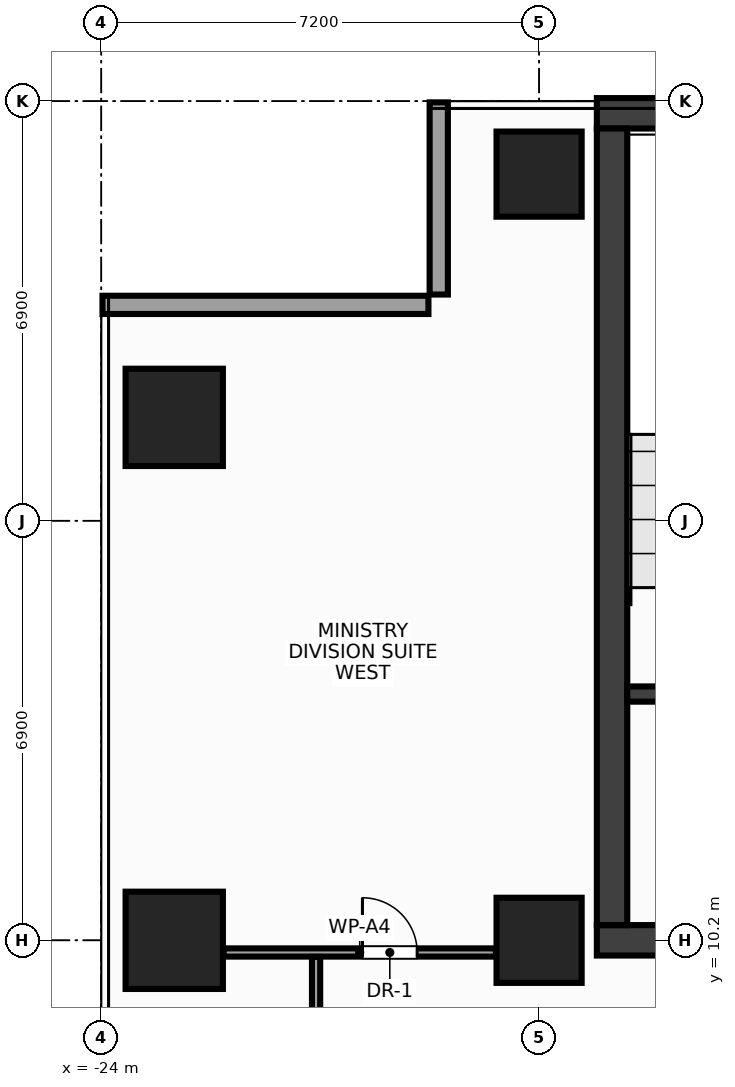
"""IFC4 building model, lengths in metres.
Left out: names, types, materials, properties, quantities, classifications, styles, units other than length and angle.
Written with IfcOpenShell. Run it as: python <this file> out.ifc"""

import sys

from ifc_helpers import new_model, si_unit, direction, frame, frame_2d, origin, origin_2d, place, context, subcontext, project, spatial, rectangle, extrude, source, transform, mapped, element, fill, save


model = new_model("IFC4")
c1 = context("Model", 3, precision=1e-05, world=origin(), true_north=direction((0.0, 1.0)))
c2 = subcontext(c1, "Body", "Model", "MODEL_VIEW")
j1 = project(units=[si_unit("LENGTHUNIT", "METRE"), si_unit("PLANEANGLEUNIT", "RADIAN")], contexts=[c1])
p1 = place(None, origin())
s1 = spatial("IfcSite", under=j1, at=p1, CompositionType="ELEMENT")
p2 = place(p1, origin())
s2 = spatial("IfcBuilding", under=s1, at=p2, CompositionType="ELEMENT")
p3 = place(p2, frame((0.0, 0.0, 203.6)))
s3 = spatial("IfcBuildingStorey", under=s2, at=p3, CompositionType="ELEMENT", Elevation=203.6)
m1 = source(origin(), c2, "Body", "SweptSolid", [
    extrude(rectangle(XDim=31.7, YDim=0.5, at=frame_2d((15.85, 0.0))), origin(), (0.0, 0.0, 1.0), 3.6),
])
p4 = place(p3, frame((-15.85, 23.8, 0.0), z_axis=(0.0, 0.0, 1.0), x_axis=(1.0, 0.0, 0.0)))
e1 = element("IfcWall", 1, at=p4, inside=s3, PredefinedType="SHEAR", context=c2, shape_type="MappedRepresentation", body=[
    mapped(m1, transform((0.0, 0.0, 0.0), x_axis=(1.0, 0.0, 0.0), y_axis=(0.0, 1.0, 0.0), z_axis=(0.0, 0.0, 1.0), scale=1.0)),
])
p5 = place(p3, frame((-15.85, 10.2, 0.0), z_axis=(0.0, 0.0, 1.0), x_axis=(1.0, 0.0, 0.0)))
e2 = element("IfcWall", 2, at=p5, inside=s3, PredefinedType="SHEAR", context=c2, shape_type="MappedRepresentation", body=[
    mapped(m1, transform((0.0, 0.0, 0.0), x_axis=(1.0, 0.0, 0.0), y_axis=(0.0, 1.0, 0.0), z_axis=(0.0, 0.0, 1.0), scale=1.0)),
])
p6 = place(p5, frame((1.7, 0.0, 0.0)))
e3 = element("IfcOpeningElement", 3, at=p6, cuts=e2, PredefinedType="OPENING", context=c2, shape_type="SweptSolid", body=[
    extrude(rectangle(XDim=1.6, YDim=2.15, at=frame_2d((0.8, 1.075))), frame((0.0, 0.262, 0.0), z_axis=(0.0, -1.0, 0.0), x_axis=(1.0, 0.0, 0.0)), (0.0, 0.0, 1.0), 0.524),
])
p7 = place(p5, frame((28.4, 0.0, 0.0)))
e4 = element("IfcOpeningElement", 4, at=p7, cuts=e2, PredefinedType="OPENING", context=c2, shape_type="SweptSolid", body=[
    extrude(rectangle(XDim=1.6, YDim=2.15, at=frame_2d((0.8, 1.075))), frame((0.0, 0.262, 0.0), z_axis=(0.0, -1.0, 0.0), x_axis=(1.0, 0.0, 0.0)), (0.0, 0.0, 1.0), 0.524),
])
p8 = place(p5, frame((15.1, 0.0, 0.0)))
e5 = element("IfcOpeningElement", 5, at=p8, cuts=e2, PredefinedType="OPENING", context=c2, shape_type="SweptSolid", body=[
    extrude(rectangle(XDim=1.5, YDim=2.2, at=frame_2d((0.75, 1.1))), frame((0.0, 0.262, 0.0), z_axis=(0.0, -1.0, 0.0), x_axis=(1.0, 0.0, 0.0)), (0.0, 0.0, 1.0), 0.524),
])
m2 = source(origin(), c2, "Body", "SweptSolid", [
    extrude(rectangle(XDim=13.1, YDim=0.5, at=frame_2d((6.55, 0.0))), origin(), (0.0, 0.0, 1.0), 3.6),
])
p9 = place(p3, frame((-15.6, 10.45, 0.0), z_axis=(0.0, 0.0, 1.0), x_axis=(0.0, 1.0, 0.0)))
e6 = element("IfcWall", 6, at=p9, inside=s3, PredefinedType="SHEAR", context=c2, shape_type="MappedRepresentation", body=[
    mapped(m2, transform((0.0, 0.0, 0.0), x_axis=(1.0, 0.0, 0.0), y_axis=(0.0, 1.0, 0.0), z_axis=(0.0, 0.0, 1.0), scale=1.0)),
])
m3 = source(origin(), c2, "Body", "SweptSolid", [
    extrude(rectangle(XDim=3.705, YDim=0.25, at=frame_2d((1.853, 0.0))), origin(), (0.0, 0.0, 1.0), 3.6),
])
p10 = place(p3, frame((-15.35, 14.25, 0.0), z_axis=(0.0, 0.0, 1.0), x_axis=(1.0, 0.0, 0.0)))
e7 = element("IfcWall", 7, at=p10, inside=s3, PredefinedType="SHEAR", context=c2, shape_type="MappedRepresentation", body=[
    mapped(m3, transform((0.0, 0.0, 0.0), x_axis=(1.0, 0.0, 0.0), y_axis=(0.0, 1.0, 0.0), z_axis=(0.0, 0.0, 1.0), scale=1.0)),
])
p11 = place(p10, frame((0.95, 0.0, 0.0)))
e8 = element("IfcOpeningElement", 8, at=p11, cuts=e7, PredefinedType="OPENING", context=c2, shape_type="SweptSolid", body=[
    extrude(rectangle(XDim=1.6, YDim=2.15, at=frame_2d((0.8, 1.075))), frame((0.0, 0.137, 0.0), z_axis=(0.0, -1.0, 0.0), x_axis=(1.0, 0.0, 0.0)), (0.0, 0.0, 1.0), 0.274),
])
m4 = source(origin(), c2, "Body", "SweptSolid", [
    extrude(rectangle(XDim=1.4, YDim=1.4, at=origin_2d()), origin(), (0.0, 0.0, 1.0), 3.6),
])
for number, where, z_axis, x_axis in (
    (9, (-16.8, 10.2, 0.0), (0.0, 0.0, 1.0), (1.0, 0.0, 0.0)),
    (10, (-16.8, 22.8, 0.0), (0.0, 0.0, 1.0), (1.0, 0.0, 0.0)),
):
    element("IfcColumn", number, at=place(p3, frame(where, z_axis=z_axis, x_axis=x_axis)), inside=s3, PredefinedType="COLUMN", context=c2, shape_type="MappedRepresentation", body=[
        mapped(m4, transform((0.0, 0.0, 0.0), x_axis=(1.0, 0.0, 0.0), y_axis=(0.0, 1.0, 0.0), z_axis=(0.0, 0.0, 1.0), scale=1.0)),
    ])
m5 = source(origin(), c2, "Body", "SweptSolid", [
    extrude(rectangle(XDim=1.6, YDim=1.6, at=origin_2d()), origin(), (0.0, 0.0, 1.0), 3.6),
])
for number, where, z_axis, x_axis in (
    (11, (-22.8, 10.2, 0.0), (0.0, 0.0, 1.0), (1.0, 0.0, 0.0)),
    (12, (-22.8, 18.8, 0.0), (0.0, 0.0, 1.0), (1.0, 0.0, 0.0)),
):
    element("IfcColumn", number, at=place(p3, frame(where, z_axis=z_axis, x_axis=x_axis)), inside=s3, PredefinedType="COLUMN", context=c2, shape_type="MappedRepresentation", body=[
        mapped(m5, transform((0.0, 0.0, 0.0), x_axis=(1.0, 0.0, 0.0), y_axis=(0.0, 1.0, 0.0), z_axis=(0.0, 0.0, 1.0), scale=1.0)),
    ])
m6 = source(origin(), c2, "Body", "SweptSolid", [
    extrude(rectangle(XDim=3.16, YDim=0.3, at=frame_2d((1.58, 0.0))), origin(), (0.0, 0.0, 1.0), 2.76),
])
p12 = place(p3, frame((-18.45, 23.98, 0.0), z_axis=(0.0, 0.0, 1.0), x_axis=(0.0, -1.0, 0.0)))
e13 = element("IfcWall", 13, at=p12, inside=s3, PredefinedType="STANDARD", context=c2, shape_type="MappedRepresentation", body=[
    mapped(m6, transform((0.0, 0.0, 0.0), x_axis=(1.0, 0.0, 0.0), y_axis=(0.0, 1.0, 0.0), z_axis=(0.0, 0.0, 1.0), scale=1.0)),
])
m7 = source(origin(), c2, "Body", "SweptSolid", [
    extrude(rectangle(XDim=5.36, YDim=0.3, at=frame_2d((2.68, 0.0))), origin(), (0.0, 0.0, 1.0), 2.76),
])
p13 = place(p3, frame((-18.62, 20.65, 0.0), z_axis=(0.0, 0.0, 1.0), x_axis=(-1.0, 0.0, 0.0)))
e14 = element("IfcWall", 14, at=p13, inside=s3, PredefinedType="STANDARD", context=c2, shape_type="MappedRepresentation", body=[
    mapped(m7, transform((0.0, 0.0, 0.0), x_axis=(1.0, 0.0, 0.0), y_axis=(0.0, 1.0, 0.0), z_axis=(0.0, 0.0, 1.0), scale=1.0)),
])
m8 = source(origin(), c2, "Body", "SweptSolid", [
    extrude(rectangle(XDim=4.48, YDim=0.135, at=frame_2d((2.24, 0.0))), origin(), (0.0, 0.0, 1.0), 2.915),
])
p14 = place(p3, frame((-21.99, 10.0, 0.0), z_axis=(0.0, 0.0, 1.0), x_axis=(1.0, 0.0, 0.0)))
e15 = element("IfcWall", 15, at=p14, inside=s3, PredefinedType="PARTITIONING", context=c2, shape_type="MappedRepresentation", body=[
    mapped(m8, transform((0.0, 0.0, 0.0), x_axis=(1.0, 0.0, 0.0), y_axis=(0.0, 1.0, 0.0), z_axis=(0.0, 0.0, 1.0), scale=1.0)),
])
p15 = place(p14, frame((2.285, 0.0, 0.0)))
e16 = element("IfcOpeningElement", 16, at=p15, cuts=e15, PredefinedType="OPENING", context=c2, shape_type="SweptSolid", body=[
    extrude(rectangle(XDim=0.9, YDim=2.15, at=frame_2d((0.45, 1.075))), frame((0.0, 0.08, 0.0), z_axis=(0.0, -1.0, 0.0), x_axis=(1.0, 0.0, 0.0)), (0.0, 0.0, 1.0), 0.159),
])
m9 = source(origin(), c2, "Body", "SweptSolid", [
    extrude(rectangle(XDim=2.373, YDim=0.135, at=frame_2d((1.186, 0.0))), origin(), (0.0, 0.0, 1.0), 3.38),
])
p16 = place(p3, frame((-20.468, 7.555, 0.0), z_axis=(0.0, 0.0, 1.0), x_axis=(0.0, 1.0, 0.0)))
e17 = element("IfcWall", 17, at=p16, inside=s3, PredefinedType="PARTITIONING", context=c2, shape_type="MappedRepresentation", body=[
    mapped(m9, transform((0.0, 0.0, 0.0), x_axis=(1.0, 0.0, 0.0), y_axis=(0.0, 1.0, 0.0), z_axis=(0.0, 0.0, 1.0), scale=1.0)),
])
m10 = source(origin(), c2, "Body", "SweptSolid", [
    extrude(rectangle(XDim=0.9, YDim=2.15, at=frame_2d((0.45, 1.075))), frame((0.0, 0.025, 0.0), z_axis=(0.0, -1.0, 0.0), x_axis=(1.0, 0.0, 0.0)), (0.0, 0.0, 1.0), 0.05),
])
p17 = place(p15, origin())
e18 = element("IfcDoor", 18, at=p17, inside=s3, OperationType="SINGLE_SWING_LEFT", PredefinedType="DOOR", context=c2, shape_type="MappedRepresentation", body=[
    mapped(m10, transform((0.0, 0.0, 0.0), x_axis=(1.0, 0.0, 0.0), y_axis=(0.0, 1.0, 0.0), z_axis=(0.0, 0.0, 1.0), scale=1.0)),
])
fill(e16, e18)
save(model, sys.argv[1])
